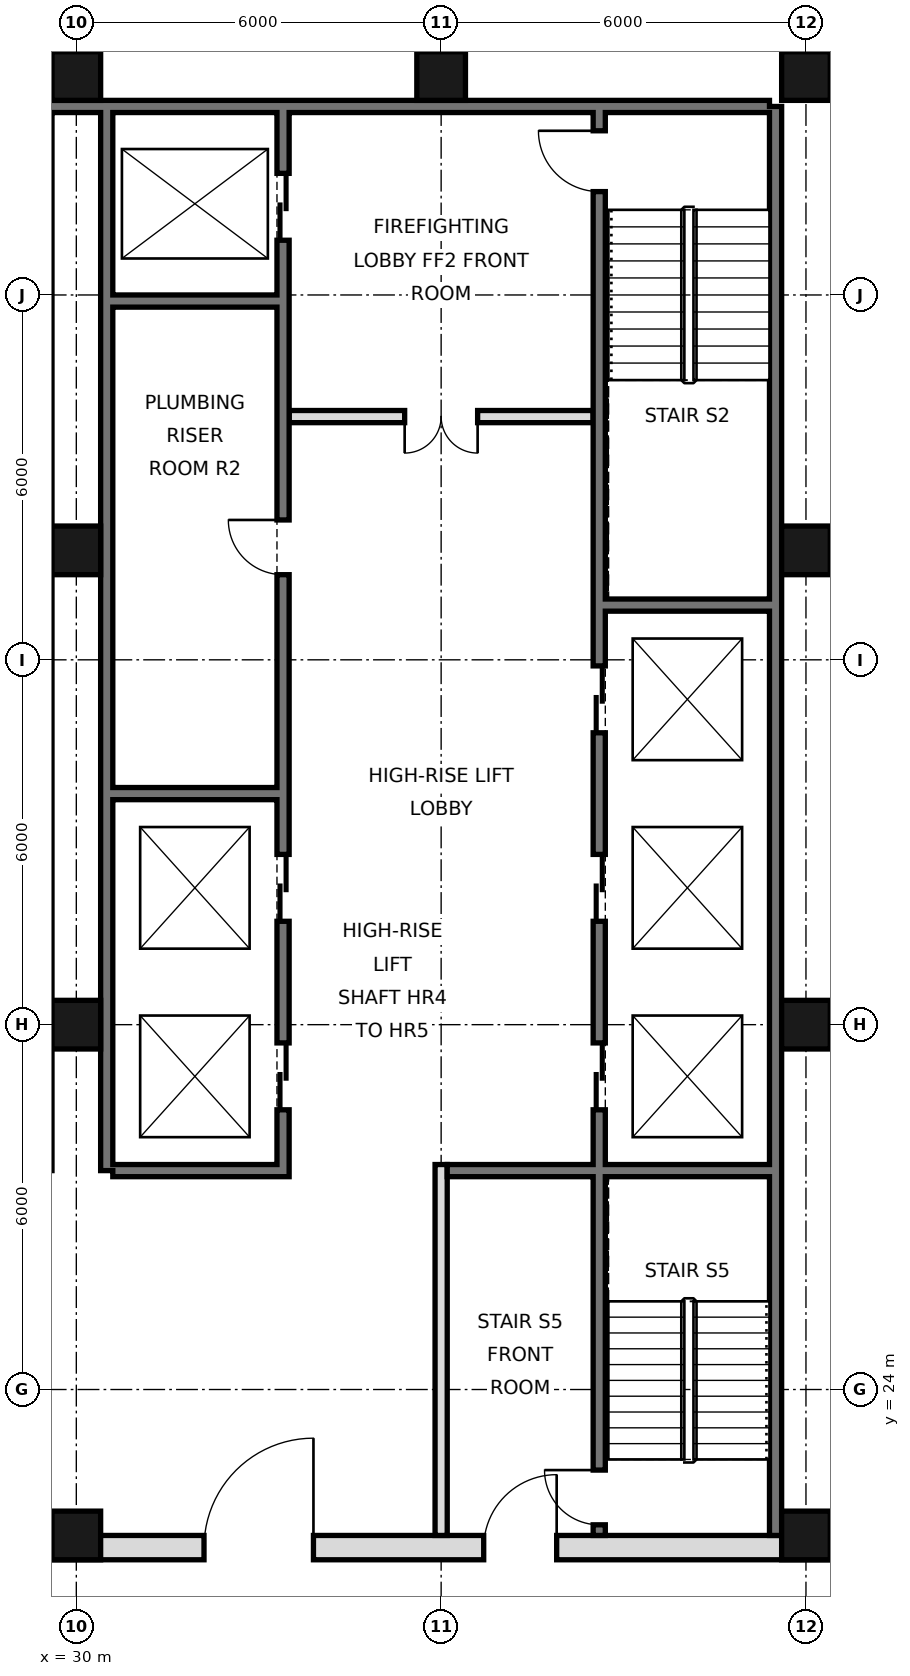
"""IFC4 building model, lengths in metres.
Left out: names, types, materials, properties, quantities, classifications, styles, units other than length and angle.
Written with IfcOpenShell. Run it as: python <this file> out.ifc"""

import sys

from ifc_helpers import new_model, si_unit, direction, frame, frame_2d, origin, origin_2d, place, context, subcontext, project, spatial, rectangle, hollow_rectangle, extrude, element, fill, save


model = new_model("IFC4")
c1 = context("Model", 3, precision=1e-05, world=origin(), true_north=direction((0.0, 1.0)))
c2 = subcontext(c1, "Body", "Model", "MODEL_VIEW")
j1 = project(units=[si_unit("LENGTHUNIT", "METRE"), si_unit("PLANEANGLEUNIT", "RADIAN")], contexts=[c1])
p1 = place(None, origin())
s1 = spatial("IfcSite", under=j1, at=p1, CompositionType="ELEMENT")
p2 = place(p1, origin())
s2 = spatial("IfcBuilding", under=s1, at=p2, CompositionType="ELEMENT")
p3 = place(p2, frame((0.0, 0.0, 290.8)))
s3 = spatial("IfcBuildingStorey", under=s2, at=p3, CompositionType="ELEMENT", Elevation=290.8)
for number, where, z_axis, x_axis in (
    (1, (30.0, 21.6, 0.0), (0.0, 0.0, 1.0), (1.0, 0.0, 0.0)),
    (2, (30.0, 30.0, 0.0), (0.0, 0.0, 1.0), (1.0, 0.0, 0.0)),
    (3, (30.0, 37.8, 0.0), (0.0, 0.0, 1.0), (1.0, 0.0, 0.0)),
    (4, (30.0, 45.6, 0.0), (0.0, 0.0, 1.0), (1.0, 0.0, 0.0)),
    (5, (36.0, 45.6, 0.0), (0.0, 0.0, 1.0), (1.0, 0.0, 0.0)),
    (6, (42.0, 21.6, 0.0), (0.0, 0.0, 1.0), (1.0, 0.0, 0.0)),
    (7, (42.0, 30.0, 0.0), (0.0, 0.0, 1.0), (1.0, 0.0, 0.0)),
    (8, (42.0, 37.8, 0.0), (0.0, 0.0, 1.0), (1.0, 0.0, 0.0)),
    (9, (42.0, 45.6, 0.0), (0.0, 0.0, 1.0), (1.0, 0.0, 0.0)),
):
    element("IfcColumn", number, at=place(p3, frame(where, z_axis=z_axis, x_axis=x_axis)), inside=s3, PredefinedType="COLUMN", context=c2, shape_type="SweptSolid", body=[
        extrude(hollow_rectangle(XDim=0.8, YDim=0.8, WallThickness=0.032, at=origin_2d()), origin(), (0.0, 0.0, 1.0), 3.6),
    ])
p4 = place(p3, frame((41.5, 21.6, 0.0), z_axis=(0.0, 0.0, 1.0), x_axis=(0.0, 1.0, 0.0)))
e10 = element("IfcWall", 10, at=p4, inside=s3, PredefinedType="SOLIDWALL", context=c2, shape_type="SweptSolid", body=[
    extrude(rectangle(XDim=23.5, YDim=0.2, at=frame_2d((11.75, 0.0))), origin(), (0.0, 0.0, 1.0), 3.42),
])
p5 = place(p3, frame((6.6, 45.1, 0.0), z_axis=(0.0, 0.0, 1.0), x_axis=(1.0, 0.0, 0.0)))
e11 = element("IfcWall", 11, at=p5, inside=s3, PredefinedType="SOLIDWALL", context=c2, shape_type="SweptSolid", body=[
    extrude(rectangle(XDim=34.8, YDim=0.2, at=frame_2d((17.4, 0.0))), origin(), (0.0, 0.0, 1.0), 3.42),
])
p6 = place(p3, frame((30.5, 27.6, 0.0), z_axis=(0.0, 0.0, 1.0), x_axis=(0.0, 1.0, 0.0)))
e12 = element("IfcWall", 12, at=p6, inside=s3, PredefinedType="SOLIDWALL", context=c2, shape_type="SweptSolid", body=[
    extrude(rectangle(XDim=17.5, YDim=0.2, at=frame_2d((8.75, 0.0))), origin(), (0.0, 0.0, 1.0), 3.42),
])
p7 = place(p3, frame((5.6, 21.4, 0.0), z_axis=(0.0, 0.0, 1.0), x_axis=(1.0, 0.0, 0.0)))
e13 = element("IfcWall", 13, at=p7, inside=s3, PredefinedType="SOLIDWALL", context=c2, shape_type="SweptSolid", body=[
    extrude(rectangle(XDim=36.8, YDim=0.4, at=frame_2d((18.4, 0.0))), origin(), (0.0, 0.0, 1.0), 3.42),
])
p8 = place(p7, frame((8.5, 0.0, 0.0)))
e14 = element("IfcOpeningElement", 14, at=p8, cuts=e13, PredefinedType="OPENING", context=c2, shape_type="SweptSolid", body=[
    extrude(rectangle(XDim=1.8, YDim=2.1, at=frame_2d((0.9, 1.05))), frame((0.0, 0.21, 0.0), z_axis=(0.0, -1.0, 0.0), x_axis=(1.0, 0.0, 0.0)), (0.0, 0.0, 1.0), 0.42),
])
p9 = place(p7, frame((17.5, 0.0, 0.0)))
e15 = element("IfcOpeningElement", 15, at=p9, cuts=e13, PredefinedType="OPENING", context=c2, shape_type="SweptSolid", body=[
    extrude(rectangle(XDim=1.8, YDim=2.1, at=frame_2d((0.9, 1.05))), frame((0.0, 0.21, 0.0), z_axis=(0.0, -1.0, 0.0), x_axis=(1.0, 0.0, 0.0)), (0.0, 0.0, 1.0), 0.42),
])
p10 = place(p7, frame((26.5, 0.0, 0.0)))
e16 = element("IfcOpeningElement", 16, at=p10, cuts=e13, PredefinedType="OPENING", context=c2, shape_type="SweptSolid", body=[
    extrude(rectangle(XDim=1.8, YDim=2.1, at=frame_2d((0.9, 1.05))), frame((0.0, 0.21, 0.0), z_axis=(0.0, -1.0, 0.0), x_axis=(1.0, 0.0, 0.0)), (0.0, 0.0, 1.0), 0.42),
])
p11 = place(p7, frame((4.5, 0.0, 0.0)))
e17 = element("IfcOpeningElement", 17, at=p11, cuts=e13, PredefinedType="OPENING", context=c2, shape_type="SweptSolid", body=[
    extrude(rectangle(XDim=1.2, YDim=2.1, at=frame_2d((0.6, 1.05))), frame((0.0, 0.21, 0.0), z_axis=(0.0, -1.0, 0.0), x_axis=(1.0, 0.0, 0.0)), (0.0, 0.0, 1.0), 0.42),
])
p12 = place(p7, frame((31.1, 0.0, 0.0)))
e18 = element("IfcOpeningElement", 18, at=p12, cuts=e13, PredefinedType="OPENING", context=c2, shape_type="SweptSolid", body=[
    extrude(rectangle(XDim=1.2, YDim=2.1, at=frame_2d((0.6, 1.05))), frame((0.0, 0.21, 0.0), z_axis=(0.0, -1.0, 0.0), x_axis=(1.0, 0.0, 0.0)), (0.0, 0.0, 1.0), 0.42),
])
p13 = place(p3, frame((33.4, 27.5, 0.0), z_axis=(0.0, 0.0, 1.0), x_axis=(0.0, 1.0, 0.0)))
e19 = element("IfcWall", 19, at=p13, inside=s3, PredefinedType="SOLIDWALL", context=c2, shape_type="SweptSolid", body=[
    extrude(rectangle(XDim=17.5, YDim=0.2, at=frame_2d((8.75, 0.0))), origin(), (0.0, 0.0, 1.0), 3.42),
])
p14 = place(p13, frame((1.1, 0.0, 0.0)))
e20 = element("IfcOpeningElement", 20, at=p14, cuts=e19, PredefinedType="OPENING", context=c2, shape_type="SweptSolid", body=[
    extrude(rectangle(XDim=1.1, YDim=2.1, at=frame_2d((0.55, 1.05))), frame((0.0, 0.11, 0.0), z_axis=(0.0, -1.0, 0.0), x_axis=(1.0, 0.0, 0.0)), (0.0, 0.0, 1.0), 0.22),
])
p15 = place(p13, frame((4.2, 0.0, 0.0)))
e21 = element("IfcOpeningElement", 21, at=p15, cuts=e19, PredefinedType="OPENING", context=c2, shape_type="SweptSolid", body=[
    extrude(rectangle(XDim=1.1, YDim=2.1, at=frame_2d((0.55, 1.05))), frame((0.0, 0.11, 0.0), z_axis=(0.0, -1.0, 0.0), x_axis=(1.0, 0.0, 0.0)), (0.0, 0.0, 1.0), 0.22),
])
p16 = place(p13, frame((15.4, 0.0, 0.0)))
e22 = element("IfcOpeningElement", 22, at=p16, cuts=e19, PredefinedType="OPENING", context=c2, shape_type="SweptSolid", body=[
    extrude(rectangle(XDim=1.1, YDim=2.1, at=frame_2d((0.55, 1.05))), frame((0.0, 0.11, 0.0), z_axis=(0.0, -1.0, 0.0), x_axis=(1.0, 0.0, 0.0)), (0.0, 0.0, 1.0), 0.22),
])
p17 = place(p13, frame((9.9, 0.0, 0.0)))
e23 = element("IfcOpeningElement", 23, at=p17, cuts=e19, PredefinedType="OPENING", context=c2, shape_type="SweptSolid", body=[
    extrude(rectangle(XDim=0.9, YDim=2.1, at=frame_2d((0.45, 1.05))), frame((0.0, 0.11, 0.0), z_axis=(0.0, -1.0, 0.0), x_axis=(1.0, 0.0, 0.0)), (0.0, 0.0, 1.0), 0.22),
])
p18 = place(p3, frame((36.0, 21.6, 0.0), z_axis=(0.0, 0.0, 1.0), x_axis=(0.0, 1.0, 0.0)))
e24 = element("IfcWall", 24, at=p18, inside=s3, PredefinedType="PARTITIONING", context=c2, shape_type="SweptSolid", body=[
    extrude(rectangle(XDim=6.1, YDim=0.2, at=frame_2d((3.05, 0.0))), origin(), (0.0, 0.0, 1.0), 3.42),
])
p19 = place(p3, frame((38.6, 21.6, 0.0), z_axis=(0.0, 0.0, 1.0), x_axis=(0.0, 1.0, 0.0)))
e25 = element("IfcWall", 25, at=p19, inside=s3, PredefinedType="SOLIDWALL", context=c2, shape_type="SweptSolid", body=[
    extrude(rectangle(XDim=23.4, YDim=0.2, at=frame_2d((11.7, 0.0))), origin(), (0.0, 0.0, 1.0), 3.42),
])
p20 = place(p19, frame((7.0, 0.0, 0.0)))
e26 = element("IfcOpeningElement", 26, at=p20, cuts=e25, PredefinedType="OPENING", context=c2, shape_type="SweptSolid", body=[
    extrude(rectangle(XDim=1.1, YDim=2.1, at=frame_2d((0.55, 1.05))), frame((0.0, 0.11, 0.0), z_axis=(0.0, -1.0, 0.0), x_axis=(1.0, 0.0, 0.0)), (0.0, 0.0, 1.0), 0.22),
])
p21 = place(p19, frame((10.1, 0.0, 0.0)))
e27 = element("IfcOpeningElement", 27, at=p21, cuts=e25, PredefinedType="OPENING", context=c2, shape_type="SweptSolid", body=[
    extrude(rectangle(XDim=1.1, YDim=2.1, at=frame_2d((0.55, 1.05))), frame((0.0, 0.11, 0.0), z_axis=(0.0, -1.0, 0.0), x_axis=(1.0, 0.0, 0.0)), (0.0, 0.0, 1.0), 0.22),
])
p22 = place(p19, frame((13.2, 0.0, 0.0)))
e28 = element("IfcOpeningElement", 28, at=p22, cuts=e25, PredefinedType="OPENING", context=c2, shape_type="SweptSolid", body=[
    extrude(rectangle(XDim=1.1, YDim=2.1, at=frame_2d((0.55, 1.05))), frame((0.0, 0.11, 0.0), z_axis=(0.0, -1.0, 0.0), x_axis=(1.0, 0.0, 0.0)), (0.0, 0.0, 1.0), 0.22),
])
p23 = place(p19, frame((22.1, 0.0, 0.0)))
e29 = element("IfcOpeningElement", 29, at=p23, cuts=e25, PredefinedType="OPENING", context=c2, shape_type="SweptSolid", body=[
    extrude(rectangle(XDim=1.0, YDim=2.1, at=frame_2d((0.5, 1.05))), frame((0.0, 0.11, 0.0), z_axis=(0.0, -1.0, 0.0), x_axis=(1.0, 0.0, 0.0)), (0.0, 0.0, 1.0), 0.22),
])
p24 = place(p19, frame((0.175, 0.0, 0.0)))
e30 = element("IfcOpeningElement", 30, at=p24, cuts=e25, PredefinedType="OPENING", context=c2, shape_type="SweptSolid", body=[
    extrude(rectangle(XDim=0.9, YDim=2.1, at=frame_2d((0.45, 1.05))), frame((0.0, 0.11, 0.0), z_axis=(0.0, -1.0, 0.0), x_axis=(1.0, 0.0, 0.0)), (0.0, 0.0, 1.0), 0.22),
])
p25 = place(p3, frame((30.6, 27.6, 0.0), z_axis=(0.0, 0.0, 1.0), x_axis=(1.0, 0.0, 0.0)))
e31 = element("IfcWall", 31, at=p25, inside=s3, PredefinedType="SOLIDWALL", context=c2, shape_type="SweptSolid", body=[
    extrude(rectangle(XDim=2.7, YDim=0.2, at=frame_2d((1.35, 0.0))), origin(), (0.0, 0.0, 1.0), 3.42),
])
p26 = place(p3, frame((36.1, 27.6, 0.0), z_axis=(0.0, 0.0, 1.0), x_axis=(1.0, 0.0, 0.0)))
e32 = element("IfcWall", 32, at=p26, inside=s3, PredefinedType="SOLIDWALL", context=c2, shape_type="SweptSolid", body=[
    extrude(rectangle(XDim=5.3, YDim=0.2, at=frame_2d((2.65, 0.0))), origin(), (0.0, 0.0, 1.0), 3.42),
])
for number, where, z_axis, x_axis in (
    (33, (30.6, 33.8, 0.0), (0.0, 0.0, 1.0), (1.0, 0.0, 0.0)),
    (34, (38.7, 36.9, 0.0), (0.0, 0.0, 1.0), (1.0, 0.0, 0.0)),
):
    element("IfcWall", number, at=place(p3, frame(where, z_axis=z_axis, x_axis=x_axis)), inside=s3, PredefinedType="SOLIDWALL", context=c2, shape_type="SweptSolid", body=[
        extrude(rectangle(XDim=2.7, YDim=0.2, at=frame_2d((1.35, 0.0))), origin(), (0.0, 0.0, 1.0), 3.42),
    ])
p27 = place(p3, frame((33.5, 40.0, 0.0), z_axis=(0.0, 0.0, 1.0), x_axis=(1.0, 0.0, 0.0)))
e35 = element("IfcWall", 35, at=p27, inside=s3, PredefinedType="PARTITIONING", context=c2, shape_type="SweptSolid", body=[
    extrude(rectangle(XDim=5.0, YDim=0.2, at=frame_2d((2.5, 0.0))), origin(), (0.0, 0.0, 1.0), 3.42),
])
p28 = place(p27, frame((1.9, 0.0, 0.0)))
e36 = element("IfcOpeningElement", 36, at=p28, cuts=e35, PredefinedType="OPENING", context=c2, shape_type="SweptSolid", body=[
    extrude(rectangle(XDim=1.2, YDim=2.1, at=frame_2d((0.6, 1.05))), frame((0.0, 0.11, 0.0), z_axis=(0.0, -1.0, 0.0), x_axis=(1.0, 0.0, 0.0)), (0.0, 0.0, 1.0), 0.22),
])
p29 = place(p3, frame((30.6, 41.9, 0.0), z_axis=(0.0, 0.0, 1.0), x_axis=(1.0, 0.0, 0.0)))
e37 = element("IfcWall", 37, at=p29, inside=s3, PredefinedType="SOLIDWALL", context=c2, shape_type="SweptSolid", body=[
    extrude(rectangle(XDim=2.7, YDim=0.2, at=frame_2d((1.35, 0.0))), origin(), (0.0, 0.0, 1.0), 3.42),
])
p30 = place(p10, frame((1.8, 0.0, 0.0), z_axis=(0.0, 0.0, 1.0), x_axis=(-1.0, 0.0, 0.0)))
e38 = element("IfcDoor", 38, at=p30, inside=s3, OperationType="SINGLE_SWING_LEFT", PredefinedType="DOOR", context=c2, shape_type="SweptSolid", body=[
    extrude(rectangle(XDim=1.8, YDim=2.1, at=frame_2d((0.9, 1.05))), frame((0.0, 0.025, 0.0), z_axis=(0.0, -1.0, 0.0), x_axis=(1.0, 0.0, 0.0)), (0.0, 0.0, 1.0), 0.05),
])
fill(e16, e38)
p31 = place(p12, frame((1.2, 0.0, 0.0), z_axis=(0.0, 0.0, 1.0), x_axis=(-1.0, 0.0, 0.0)))
e39 = element("IfcDoor", 39, at=p31, inside=s3, OperationType="SINGLE_SWING_LEFT", PredefinedType="DOOR", context=c2, shape_type="SweptSolid", body=[
    extrude(rectangle(XDim=1.2, YDim=2.1, at=frame_2d((0.6, 1.05))), frame((0.0, 0.025, 0.0), z_axis=(0.0, -1.0, 0.0), x_axis=(1.0, 0.0, 0.0)), (0.0, 0.0, 1.0), 0.05),
])
fill(e18, e39)
p32 = place(p28, frame((1.2, 0.0, 0.0), z_axis=(0.0, 0.0, 1.0), x_axis=(-1.0, 0.0, 0.0)))
e40 = element("IfcDoor", 40, at=p32, inside=s3, OperationType="DOUBLE_DOOR_SINGLE_SWING", PredefinedType="DOOR", context=c2, shape_type="SweptSolid", body=[
    extrude(rectangle(XDim=1.2, YDim=2.1, at=frame_2d((0.6, 1.05))), frame((0.0, 0.025, 0.0), z_axis=(0.0, -1.0, 0.0), x_axis=(1.0, 0.0, 0.0)), (0.0, 0.0, 1.0), 0.05),
])
fill(e36, e40)
p33 = place(p20, origin())
e41 = element("IfcDoor", 41, at=p33, inside=s3, OperationType="DOUBLE_DOOR_SLIDING", PredefinedType="DOOR", context=c2, shape_type="SweptSolid", body=[
    extrude(rectangle(XDim=1.1, YDim=2.1, at=frame_2d((0.55, 1.05))), frame((0.0, 0.025, 0.0), z_axis=(0.0, -1.0, 0.0), x_axis=(1.0, 0.0, 0.0)), (0.0, 0.0, 1.0), 0.05),
])
fill(e26, e41)
p34 = place(p21, origin())
e42 = element("IfcDoor", 42, at=p34, inside=s3, OperationType="DOUBLE_DOOR_SLIDING", PredefinedType="DOOR", context=c2, shape_type="SweptSolid", body=[
    extrude(rectangle(XDim=1.1, YDim=2.1, at=frame_2d((0.55, 1.05))), frame((0.0, 0.025, 0.0), z_axis=(0.0, -1.0, 0.0), x_axis=(1.0, 0.0, 0.0)), (0.0, 0.0, 1.0), 0.05),
])
fill(e27, e42)
p35 = place(p22, origin())
e43 = element("IfcDoor", 43, at=p35, inside=s3, OperationType="DOUBLE_DOOR_SLIDING", PredefinedType="DOOR", context=c2, shape_type="SweptSolid", body=[
    extrude(rectangle(XDim=1.1, YDim=2.1, at=frame_2d((0.55, 1.05))), frame((0.0, 0.025, 0.0), z_axis=(0.0, -1.0, 0.0), x_axis=(1.0, 0.0, 0.0)), (0.0, 0.0, 1.0), 0.05),
])
fill(e28, e43)
p36 = place(p14, origin())
e44 = element("IfcDoor", 44, at=p36, inside=s3, OperationType="DOUBLE_DOOR_SLIDING", PredefinedType="DOOR", context=c2, shape_type="SweptSolid", body=[
    extrude(rectangle(XDim=1.1, YDim=2.1, at=frame_2d((0.55, 1.05))), frame((0.0, 0.025, 0.0), z_axis=(0.0, -1.0, 0.0), x_axis=(1.0, 0.0, 0.0)), (0.0, 0.0, 1.0), 0.05),
])
fill(e20, e44)
p37 = place(p15, origin())
e45 = element("IfcDoor", 45, at=p37, inside=s3, OperationType="DOUBLE_DOOR_SLIDING", PredefinedType="DOOR", context=c2, shape_type="SweptSolid", body=[
    extrude(rectangle(XDim=1.1, YDim=2.1, at=frame_2d((0.55, 1.05))), frame((0.0, 0.025, 0.0), z_axis=(0.0, -1.0, 0.0), x_axis=(1.0, 0.0, 0.0)), (0.0, 0.0, 1.0), 0.05),
])
fill(e21, e45)
p38 = place(p16, origin())
e46 = element("IfcDoor", 46, at=p38, inside=s3, OperationType="DOUBLE_DOOR_SLIDING", PredefinedType="DOOR", context=c2, shape_type="SweptSolid", body=[
    extrude(rectangle(XDim=1.1, YDim=2.1, at=frame_2d((0.55, 1.05))), frame((0.0, 0.025, 0.0), z_axis=(0.0, -1.0, 0.0), x_axis=(1.0, 0.0, 0.0)), (0.0, 0.0, 1.0), 0.05),
])
fill(e22, e46)
p39 = place(p23, frame((1.0, 0.0, 0.0), z_axis=(0.0, 0.0, 1.0), x_axis=(-1.0, 0.0, 0.0)))
e47 = element("IfcDoor", 47, at=p39, inside=s3, OperationType="SINGLE_SWING_LEFT", PredefinedType="DOOR", context=c2, shape_type="SweptSolid", body=[
    extrude(rectangle(XDim=1.0, YDim=2.1, at=frame_2d((0.5, 1.05))), frame((0.0, 0.025, 0.0), z_axis=(0.0, -1.0, 0.0), x_axis=(1.0, 0.0, 0.0)), (0.0, 0.0, 1.0), 0.05),
])
fill(e29, e47)
p40 = place(p24, frame((0.9, 0.0, 0.0), z_axis=(0.0, 0.0, 1.0), x_axis=(-1.0, 0.0, 0.0)))
e48 = element("IfcDoor", 48, at=p40, inside=s3, OperationType="SINGLE_SWING_LEFT", PredefinedType="DOOR", context=c2, shape_type="SweptSolid", body=[
    extrude(rectangle(XDim=0.9, YDim=2.1, at=frame_2d((0.45, 1.05))), frame((0.0, 0.025, 0.0), z_axis=(0.0, -1.0, 0.0), x_axis=(1.0, 0.0, 0.0)), (0.0, 0.0, 1.0), 0.05),
])
fill(e30, e48)
p41 = place(p17, frame((0.9, 0.0, 0.0), z_axis=(0.0, 0.0, 1.0), x_axis=(-1.0, 0.0, 0.0)))
e49 = element("IfcDoor", 49, at=p41, inside=s3, OperationType="SINGLE_SWING_LEFT", PredefinedType="DOOR", context=c2, shape_type="SweptSolid", body=[
    extrude(rectangle(XDim=0.9, YDim=2.1, at=frame_2d((0.45, 1.05))), frame((0.0, 0.025, 0.0), z_axis=(0.0, -1.0, 0.0), x_axis=(1.0, 0.0, 0.0)), (0.0, 0.0, 1.0), 0.05),
])
fill(e23, e49)
save(model, sys.argv[1])
